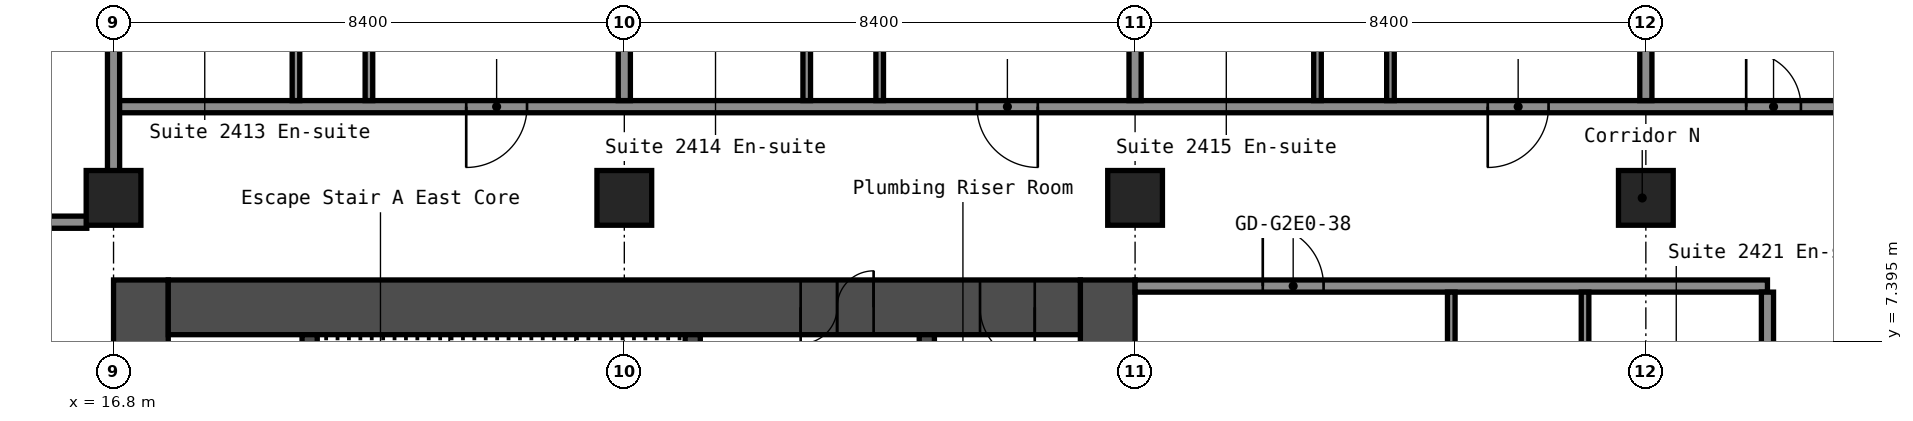
"""IFC4 building model, lengths in metres.
Left out: names, types, materials, properties, quantities, classifications, styles, units other than length and angle.
Written with IfcOpenShell. Run it as: python <this file> out.ifc"""

import sys

from ifc_helpers import new_model, si_unit, direction, frame, frame_2d, origin, origin_2d, place, context, subcontext, project, spatial, rectangle, hollow_rectangle, extrude, element, fill, save


model = new_model("IFC4")
c1 = context("Model", 3, precision=1e-05, world=origin(), true_north=direction((0.0, 1.0)))
c2 = subcontext(c1, "Body", "Model", "MODEL_VIEW")
j1 = project(units=[si_unit("LENGTHUNIT", "METRE"), si_unit("PLANEANGLEUNIT", "RADIAN")], contexts=[c1])
p1 = place(None, origin())
s1 = spatial("IfcSite", under=j1, at=p1, CompositionType="ELEMENT")
p2 = place(p1, origin())
s2 = spatial("IfcBuilding", under=s1, at=p2, CompositionType="ELEMENT")
p3 = place(p2, frame((0.0, 0.0, 88.2)))
s3 = spatial("IfcBuildingStorey", under=s2, at=p3, CompositionType="ELEMENT", Elevation=88.2)
for number, where, z_axis, x_axis in (
    (1, (16.8, 9.75, 0.0), (0.0, 0.0, 1.0), (1.0, 0.0, 0.0)),
    (2, (25.2, 9.75, 0.0), (0.0, 0.0, 1.0), (1.0, 0.0, 0.0)),
    (3, (33.6, 9.75, 0.0), (0.0, 0.0, 1.0), (1.0, 0.0, 0.0)),
    (4, (42.0, 9.75, 0.0), (0.0, 0.0, 1.0), (1.0, 0.0, 0.0)),
):
    element("IfcColumn", number, at=place(p3, frame(where, z_axis=z_axis, x_axis=x_axis)), inside=s3, PredefinedType="COLUMN", context=c2, shape_type="SweptSolid", body=[
        extrude(hollow_rectangle(XDim=0.9, YDim=0.9, WallThickness=0.036, at=origin_2d()), origin(), (0.0, 0.0, 1.0), 2.8),
    ])
p4 = place(p3, frame((17.25, -8.4, 0.0), z_axis=(0.0, 0.0, 1.0), x_axis=(0.0, 1.0, 0.0)))
e5 = element("IfcWall", 5, at=p4, inside=s3, PredefinedType="SHEAR", context=c2, shape_type="SweptSolid", body=[
    extrude(rectangle(XDim=16.8, YDim=0.9, at=frame_2d((8.4, 0.0))), origin(), (0.0, 0.0, 1.0), 2.8),
])
p5 = place(p4, frame((7.6, 0.0, 0.0)))
e6 = element("IfcOpeningElement", 6, at=p5, cuts=e5, PredefinedType="OPENING", context=c2, shape_type="SweptSolid", body=[
    extrude(rectangle(XDim=1.2, YDim=2.1, at=frame_2d((0.6, 1.05))), frame((0.0, 0.46, 0.0), z_axis=(0.0, -1.0, 0.0), x_axis=(1.0, 0.0, 0.0)), (0.0, 0.0, 1.0), 0.92),
])
p6 = place(p3, frame((33.15, -8.4, 0.0), z_axis=(0.0, 0.0, 1.0), x_axis=(0.0, 1.0, 0.0)))
e7 = element("IfcWall", 7, at=p6, inside=s3, PredefinedType="SHEAR", context=c2, shape_type="SweptSolid", body=[
    extrude(rectangle(XDim=16.8, YDim=0.9, at=frame_2d((8.4, 0.0))), origin(), (0.0, 0.0, 1.0), 2.8),
])
p7 = place(p3, frame((17.7, 7.95, 0.0), z_axis=(0.0, 0.0, 1.0), x_axis=(1.0, 0.0, 0.0)))
e8 = element("IfcWall", 8, at=p7, inside=s3, PredefinedType="SHEAR", context=c2, shape_type="SweptSolid", body=[
    extrude(rectangle(XDim=15.0, YDim=0.9, at=frame_2d((7.5, 0.0))), origin(), (0.0, 0.0, 1.0), 2.8),
])
p8 = place(p7, frame((10.4, 0.0, 0.0)))
e9 = element("IfcOpeningElement", 9, at=p8, cuts=e8, PredefinedType="OPENING", context=c2, shape_type="SweptSolid", body=[
    extrude(rectangle(XDim=1.2, YDim=2.1, at=frame_2d((0.6, 1.05))), frame((0.0, 0.46, 0.0), z_axis=(0.0, -1.0, 0.0), x_axis=(1.0, 0.0, 0.0)), (0.0, 0.0, 1.0), 0.92),
])
p9 = place(p7, frame((13.35, 0.0, 0.0)))
e10 = element("IfcOpeningElement", 10, at=p9, cuts=e8, PredefinedType="OPENING", context=c2, shape_type="SweptSolid", body=[
    extrude(rectangle(XDim=0.9, YDim=2.1, at=frame_2d((0.45, 1.05))), frame((0.0, 0.46, 0.0), z_axis=(0.0, -1.0, 0.0), x_axis=(1.0, 0.0, 0.0)), (0.0, 0.0, 1.0), 0.92),
])
p10 = place(p3, frame((20.025, 1.2, 0.0), z_axis=(0.0, 0.0, 1.0), x_axis=(0.0, 1.0, 0.0)))
e11 = element("IfcWall", 11, at=p10, inside=s3, PredefinedType="SHEAR", context=c2, shape_type="SweptSolid", body=[
    extrude(rectangle(XDim=6.3, YDim=0.25, at=frame_2d((3.15, 0.0))), origin(), (0.0, 0.0, 1.0), 2.8),
])
p11 = place(p3, frame((26.325, 3.75, 0.0), z_axis=(0.0, 0.0, 1.0), x_axis=(0.0, 1.0, 0.0)))
e12 = element("IfcWall", 12, at=p11, inside=s3, PredefinedType="SHEAR", context=c2, shape_type="SweptSolid", body=[
    extrude(rectangle(XDim=3.75, YDim=0.25, at=frame_2d((1.875, 0.0))), origin(), (0.0, 0.0, 1.0), 2.8),
])
p12 = place(p11, frame((1.25, 0.0, 0.0)))
e13 = element("IfcOpeningElement", 13, at=p12, cuts=e12, PredefinedType="OPENING", context=c2, shape_type="SweptSolid", body=[
    extrude(rectangle(XDim=1.2, YDim=2.1, at=frame_2d((0.6, 1.05))), frame((0.0, 0.135, 0.0), z_axis=(0.0, -1.0, 0.0), x_axis=(1.0, 0.0, 0.0)), (0.0, 0.0, 1.0), 0.27),
])
p13 = place(p3, frame((30.175, 1.45, 0.0), z_axis=(0.0, 0.0, 1.0), x_axis=(0.0, 1.0, 0.0)))
e14 = element("IfcWall", 14, at=p13, inside=s3, PredefinedType="SHEAR", context=c2, shape_type="SweptSolid", body=[
    extrude(rectangle(XDim=6.05, YDim=0.25, at=frame_2d((3.025, 0.0))), origin(), (0.0, 0.0, 1.0), 2.8),
])
p14 = place(p13, frame((2.625, 0.0, 0.0)))
e15 = element("IfcOpeningElement", 15, at=p14, cuts=e14, PredefinedType="OPENING", context=c2, shape_type="SweptSolid", body=[
    extrude(rectangle(XDim=1.1, YDim=2.1, at=frame_2d((0.55, 1.05))), frame((0.0, 0.135, 0.0), z_axis=(0.0, -1.0, 0.0), x_axis=(1.0, 0.0, 0.0)), (0.0, 0.0, 1.0), 0.27),
])
p15 = place(p3, frame((33.6, 8.3, 0.0), z_axis=(0.0, 0.0, 1.0), x_axis=(1.0, 0.0, 0.0)))
e16 = element("IfcWall", 16, at=p15, inside=s3, PredefinedType="PARTITIONING", context=c2, shape_type="SweptSolid", body=[
    extrude(rectangle(XDim=10.4, YDim=0.2, at=frame_2d((5.2, 0.0))), origin(), (0.0, 0.0, 1.0), 2.8),
])
p16 = place(p15, frame((2.1, 0.0, 0.0)))
e17 = element("IfcOpeningElement", 17, at=p16, cuts=e16, PredefinedType="OPENING", context=c2, shape_type="SweptSolid", body=[
    extrude(rectangle(XDim=1.0, YDim=2.1, at=frame_2d((0.5, 1.05))), frame((0.0, 0.11, 0.0), z_axis=(0.0, -1.0, 0.0), x_axis=(1.0, 0.0, 0.0)), (0.0, 0.0, 1.0), 0.22),
])
p17 = place(p3, frame((-16.36, 9.35, 0.0), z_axis=(0.0, 0.0, 1.0), x_axis=(1.0, 0.0, 0.0)))
e18 = element("IfcWall", 18, at=p17, inside=s3, PredefinedType="PARTITIONING", context=c2, shape_type="SweptSolid", body=[
    extrude(rectangle(XDim=32.72, YDim=0.2, at=frame_2d((16.36, 0.0))), origin(), (0.0, 0.0, 1.0), 2.8),
])
p18 = place(p17, frame((1.16, 0.0, 0.0)))
e19 = element("IfcOpeningElement", 19, at=p18, cuts=e18, PredefinedType="OPENING", context=c2, shape_type="SweptSolid", body=[
    extrude(rectangle(XDim=1.0, YDim=2.1, at=frame_2d((0.5, 1.05))), frame((0.0, 0.11, 0.0), z_axis=(0.0, -1.0, 0.0), x_axis=(1.0, 0.0, 0.0)), (0.0, 0.0, 1.0), 0.22),
])
p19 = place(p17, frame((9.56, 0.0, 0.0)))
e20 = element("IfcOpeningElement", 20, at=p19, cuts=e18, PredefinedType="OPENING", context=c2, shape_type="SweptSolid", body=[
    extrude(rectangle(XDim=1.0, YDim=2.1, at=frame_2d((0.5, 1.05))), frame((0.0, 0.11, 0.0), z_axis=(0.0, -1.0, 0.0), x_axis=(1.0, 0.0, 0.0)), (0.0, 0.0, 1.0), 0.22),
])
p20 = place(p17, frame((22.16, 0.0, 0.0)))
e21 = element("IfcOpeningElement", 21, at=p20, cuts=e18, PredefinedType="OPENING", context=c2, shape_type="SweptSolid", body=[
    extrude(rectangle(XDim=1.0, YDim=2.1, at=frame_2d((0.5, 1.05))), frame((0.0, 0.11, 0.0), z_axis=(0.0, -1.0, 0.0), x_axis=(1.0, 0.0, 0.0)), (0.0, 0.0, 1.0), 0.22),
])
p21 = place(p17, frame((30.56, 0.0, 0.0)))
e22 = element("IfcOpeningElement", 22, at=p21, cuts=e18, PredefinedType="OPENING", context=c2, shape_type="SweptSolid", body=[
    extrude(rectangle(XDim=1.0, YDim=2.1, at=frame_2d((0.5, 1.05))), frame((0.0, 0.11, 0.0), z_axis=(0.0, -1.0, 0.0), x_axis=(1.0, 0.0, 0.0)), (0.0, 0.0, 1.0), 0.22),
])
p22 = place(p3, frame((16.8, 11.25, 0.0), z_axis=(0.0, 0.0, 1.0), x_axis=(1.0, 0.0, 0.0)))
e23 = element("IfcWall", 23, at=p22, inside=s3, PredefinedType="PARTITIONING", context=c2, shape_type="SweptSolid", body=[
    extrude(rectangle(XDim=29.7, YDim=0.2, at=frame_2d((14.85, 0.0))), origin(), (0.0, 0.0, 1.0), 2.8),
])
p23 = place(p22, frame((5.8, 0.0, 0.0)))
e24 = element("IfcOpeningElement", 24, at=p23, cuts=e23, PredefinedType="OPENING", context=c2, shape_type="SweptSolid", body=[
    extrude(rectangle(XDim=1.0, YDim=2.1, at=frame_2d((0.5, 1.05))), frame((0.0, 0.11, 0.0), z_axis=(0.0, -1.0, 0.0), x_axis=(1.0, 0.0, 0.0)), (0.0, 0.0, 1.0), 0.22),
])
p24 = place(p22, frame((14.2, 0.0, 0.0)))
e25 = element("IfcOpeningElement", 25, at=p24, cuts=e23, PredefinedType="OPENING", context=c2, shape_type="SweptSolid", body=[
    extrude(rectangle(XDim=1.0, YDim=2.1, at=frame_2d((0.5, 1.05))), frame((0.0, 0.11, 0.0), z_axis=(0.0, -1.0, 0.0), x_axis=(1.0, 0.0, 0.0)), (0.0, 0.0, 1.0), 0.22),
])
p25 = place(p22, frame((22.6, 0.0, 0.0)))
e26 = element("IfcOpeningElement", 26, at=p25, cuts=e23, PredefinedType="OPENING", context=c2, shape_type="SweptSolid", body=[
    extrude(rectangle(XDim=1.0, YDim=2.1, at=frame_2d((0.5, 1.05))), frame((0.0, 0.11, 0.0), z_axis=(0.0, -1.0, 0.0), x_axis=(1.0, 0.0, 0.0)), (0.0, 0.0, 1.0), 0.22),
])
p26 = place(p22, frame((26.85, 0.0, 0.0)))
e27 = element("IfcOpeningElement", 27, at=p26, cuts=e23, PredefinedType="OPENING", context=c2, shape_type="SweptSolid", body=[
    extrude(rectangle(XDim=0.9, YDim=2.1, at=frame_2d((0.45, 1.05))), frame((0.0, 0.11, 0.0), z_axis=(0.0, -1.0, 0.0), x_axis=(1.0, 0.0, 0.0)), (0.0, 0.0, 1.0), 0.22),
])
p27 = place(p3, frame((16.8, 10.19, 0.0), z_axis=(0.0, 0.0, 1.0), x_axis=(0.0, 1.0, 0.0)))
e28 = element("IfcWall", 28, at=p27, inside=s3, PredefinedType="PARTITIONING", context=c2, shape_type="SweptSolid", body=[
    extrude(rectangle(XDim=13.36, YDim=0.2, at=frame_2d((6.68, 0.0))), origin(), (0.0, 0.0, 1.0), 2.8),
])
p28 = place(p3, frame((19.8, 11.35, 0.0), z_axis=(0.0, 0.0, 1.0), x_axis=(0.0, 1.0, 0.0)))
e29 = element("IfcWall", 29, at=p28, inside=s3, PredefinedType="PARTITIONING", context=c2, shape_type="SweptSolid", body=[
    extrude(rectangle(XDim=3.1, YDim=0.125, at=frame_2d((1.55, 0.0))), origin(), (0.0, 0.0, 1.0), 2.8),
])
p29 = place(p3, frame((21.0, 11.35, 0.0), z_axis=(0.0, 0.0, 1.0), x_axis=(0.0, 1.0, 0.0)))
e30 = element("IfcWall", 30, at=p29, inside=s3, PredefinedType="PARTITIONING", context=c2, shape_type="SweptSolid", body=[
    extrude(rectangle(XDim=12.2, YDim=0.125, at=frame_2d((6.1, 0.0))), origin(), (0.0, 0.0, 1.0), 2.8),
])
p30 = place(p29, frame((4.05, 0.0, 0.0)))
e31 = element("IfcOpeningElement", 31, at=p30, cuts=e30, PredefinedType="OPENING", context=c2, shape_type="SweptSolid", body=[
    extrude(rectangle(XDim=0.9, YDim=2.1, at=frame_2d((0.45, 1.05))), frame((0.0, 0.073, 0.0), z_axis=(0.0, -1.0, 0.0), x_axis=(1.0, 0.0, 0.0)), (0.0, 0.0, 1.0), 0.145),
])
p31 = place(p3, frame((25.2, 11.35, 0.0), z_axis=(0.0, 0.0, 1.0), x_axis=(0.0, 1.0, 0.0)))
e32 = element("IfcWall", 32, at=p31, inside=s3, PredefinedType="PARTITIONING", context=c2, shape_type="SweptSolid", body=[
    extrude(rectangle(XDim=12.2, YDim=0.2, at=frame_2d((6.1, 0.0))), origin(), (0.0, 0.0, 1.0), 2.8),
])
p32 = place(p3, frame((28.2, 11.35, 0.0), z_axis=(0.0, 0.0, 1.0), x_axis=(0.0, 1.0, 0.0)))
e33 = element("IfcWall", 33, at=p32, inside=s3, PredefinedType="PARTITIONING", context=c2, shape_type="SweptSolid", body=[
    extrude(rectangle(XDim=3.1, YDim=0.125, at=frame_2d((1.55, 0.0))), origin(), (0.0, 0.0, 1.0), 2.8),
])
p33 = place(p3, frame((29.4, 11.35, 0.0), z_axis=(0.0, 0.0, 1.0), x_axis=(0.0, 1.0, 0.0)))
e34 = element("IfcWall", 34, at=p33, inside=s3, PredefinedType="PARTITIONING", context=c2, shape_type="SweptSolid", body=[
    extrude(rectangle(XDim=12.2, YDim=0.125, at=frame_2d((6.1, 0.0))), origin(), (0.0, 0.0, 1.0), 2.8),
])
p34 = place(p33, frame((4.05, 0.0, 0.0)))
e35 = element("IfcOpeningElement", 35, at=p34, cuts=e34, PredefinedType="OPENING", context=c2, shape_type="SweptSolid", body=[
    extrude(rectangle(XDim=0.9, YDim=2.1, at=frame_2d((0.45, 1.05))), frame((0.0, 0.073, 0.0), z_axis=(0.0, -1.0, 0.0), x_axis=(1.0, 0.0, 0.0)), (0.0, 0.0, 1.0), 0.145),
])
p35 = place(p3, frame((33.6, 11.35, 0.0), z_axis=(0.0, 0.0, 1.0), x_axis=(0.0, 1.0, 0.0)))
e36 = element("IfcWall", 36, at=p35, inside=s3, PredefinedType="PARTITIONING", context=c2, shape_type="SweptSolid", body=[
    extrude(rectangle(XDim=12.2, YDim=0.2, at=frame_2d((6.1, 0.0))), origin(), (0.0, 0.0, 1.0), 2.8),
])
p36 = place(p3, frame((36.6, 11.35, 0.0), z_axis=(0.0, 0.0, 1.0), x_axis=(0.0, 1.0, 0.0)))
e37 = element("IfcWall", 37, at=p36, inside=s3, PredefinedType="PARTITIONING", context=c2, shape_type="SweptSolid", body=[
    extrude(rectangle(XDim=3.1, YDim=0.125, at=frame_2d((1.55, 0.0))), origin(), (0.0, 0.0, 1.0), 2.8),
])
p37 = place(p3, frame((37.8, 11.35, 0.0), z_axis=(0.0, 0.0, 1.0), x_axis=(0.0, 1.0, 0.0)))
e38 = element("IfcWall", 38, at=p37, inside=s3, PredefinedType="PARTITIONING", context=c2, shape_type="SweptSolid", body=[
    extrude(rectangle(XDim=12.2, YDim=0.125, at=frame_2d((6.1, 0.0))), origin(), (0.0, 0.0, 1.0), 2.8),
])
p38 = place(p37, frame((4.05, 0.0, 0.0)))
e39 = element("IfcOpeningElement", 39, at=p38, cuts=e38, PredefinedType="OPENING", context=c2, shape_type="SweptSolid", body=[
    extrude(rectangle(XDim=0.9, YDim=2.1, at=frame_2d((0.45, 1.05))), frame((0.0, 0.073, 0.0), z_axis=(0.0, -1.0, 0.0), x_axis=(1.0, 0.0, 0.0)), (0.0, 0.0, 1.0), 0.145),
])
p39 = place(p3, frame((38.8, -8.2, 0.0), z_axis=(0.0, 0.0, 1.0), x_axis=(0.0, 1.0, 0.0)))
e40 = element("IfcWall", 40, at=p39, inside=s3, PredefinedType="PARTITIONING", context=c2, shape_type="SweptSolid", body=[
    extrude(rectangle(XDim=16.4, YDim=0.125, at=frame_2d((8.2, 0.0))), origin(), (0.0, 0.0, 1.0), 2.8),
])
p40 = place(p39, frame((4.05, 0.0, 0.0)))
e41 = element("IfcOpeningElement", 41, at=p40, cuts=e40, PredefinedType="OPENING", context=c2, shape_type="SweptSolid", body=[
    extrude(rectangle(XDim=0.9, YDim=2.1, at=frame_2d((0.45, 1.05))), frame((0.0, 0.073, 0.0), z_axis=(0.0, -1.0, 0.0), x_axis=(1.0, 0.0, 0.0)), (0.0, 0.0, 1.0), 0.145),
])
p41 = place(p39, frame((11.45, 0.0, 0.0)))
e42 = element("IfcOpeningElement", 42, at=p41, cuts=e40, PredefinedType="OPENING", context=c2, shape_type="SweptSolid", body=[
    extrude(rectangle(XDim=0.9, YDim=2.1, at=frame_2d((0.45, 1.05))), frame((0.0, 0.073, 0.0), z_axis=(0.0, -1.0, 0.0), x_axis=(1.0, 0.0, 0.0)), (0.0, 0.0, 1.0), 0.145),
])
p42 = place(p3, frame((41.0, 5.1, 0.0), z_axis=(0.0, 0.0, 1.0), x_axis=(0.0, 1.0, 0.0)))
e43 = element("IfcWall", 43, at=p42, inside=s3, PredefinedType="PARTITIONING", context=c2, shape_type="SweptSolid", body=[
    extrude(rectangle(XDim=3.1, YDim=0.125, at=frame_2d((1.55, 0.0))), origin(), (0.0, 0.0, 1.0), 2.8),
])
p43 = place(p3, frame((42.0, 11.35, 0.0), z_axis=(0.0, 0.0, 1.0), x_axis=(0.0, 1.0, 0.0)))
e44 = element("IfcWall", 44, at=p43, inside=s3, PredefinedType="PARTITIONING", context=c2, shape_type="SweptSolid", body=[
    extrude(rectangle(XDim=12.2, YDim=0.2, at=frame_2d((6.1, 0.0))), origin(), (0.0, 0.0, 1.0), 2.8),
])
p44 = place(p3, frame((44.0, -8.2, 0.0), z_axis=(0.0, 0.0, 1.0), x_axis=(0.0, 1.0, 0.0)))
e45 = element("IfcWall", 45, at=p44, inside=s3, PredefinedType="PARTITIONING", context=c2, shape_type="SweptSolid", body=[
    extrude(rectangle(XDim=16.4, YDim=0.2, at=frame_2d((8.2, 0.0))), origin(), (0.0, 0.0, 1.0), 2.8),
])
p45 = place(p8, origin())
e46 = element("IfcDoor", 46, at=p45, inside=s3, OperationType="DOUBLE_DOOR_SINGLE_SWING", PredefinedType="DOOR", context=c2, shape_type="SweptSolid", body=[
    extrude(rectangle(XDim=1.2, YDim=2.1, at=frame_2d((0.6, 1.05))), frame((0.0, 0.025, 0.0), z_axis=(0.0, -1.0, 0.0), x_axis=(1.0, 0.0, 0.0)), (0.0, 0.0, 1.0), 0.05),
])
fill(e9, e46)
p46 = place(p9, origin())
e47 = element("IfcDoor", 47, at=p46, inside=s3, OperationType="SINGLE_SWING_RIGHT", PredefinedType="DOOR", context=c2, shape_type="SweptSolid", body=[
    extrude(rectangle(XDim=0.9, YDim=2.1, at=frame_2d((0.45, 1.05))), frame((0.0, 0.025, 0.0), z_axis=(0.0, -1.0, 0.0), x_axis=(1.0, 0.0, 0.0)), (0.0, 0.0, 1.0), 0.05),
])
fill(e10, e47)
p47 = place(p16, origin())
e48 = element("IfcDoor", 48, at=p47, inside=s3, OperationType="SINGLE_SWING_RIGHT", PredefinedType="DOOR", context=c2, shape_type="SweptSolid", body=[
    extrude(rectangle(XDim=1.0, YDim=2.1, at=frame_2d((0.5, 1.05))), frame((0.0, 0.025, 0.0), z_axis=(0.0, -1.0, 0.0), x_axis=(1.0, 0.0, 0.0)), (0.0, 0.0, 1.0), 0.05),
])
fill(e17, e48)
p48 = place(p23, origin())
e49 = element("IfcDoor", 49, at=p48, inside=s3, OperationType="SINGLE_SWING_LEFT", PredefinedType="DOOR", context=c2, shape_type="SweptSolid", body=[
    extrude(rectangle(XDim=1.0, YDim=2.1, at=frame_2d((0.5, 1.05))), frame((0.0, 0.025, 0.0), z_axis=(0.0, -1.0, 0.0), x_axis=(1.0, 0.0, 0.0)), (0.0, 0.0, 1.0), 0.05),
])
fill(e24, e49)
p49 = place(p24, origin())
e50 = element("IfcDoor", 50, at=p49, inside=s3, OperationType="SINGLE_SWING_RIGHT", PredefinedType="DOOR", context=c2, shape_type="SweptSolid", body=[
    extrude(rectangle(XDim=1.0, YDim=2.1, at=frame_2d((0.5, 1.05))), frame((0.0, 0.025, 0.0), z_axis=(0.0, -1.0, 0.0), x_axis=(1.0, 0.0, 0.0)), (0.0, 0.0, 1.0), 0.05),
])
fill(e25, e50)
p50 = place(p25, origin())
e51 = element("IfcDoor", 51, at=p50, inside=s3, OperationType="SINGLE_SWING_LEFT", PredefinedType="DOOR", context=c2, shape_type="SweptSolid", body=[
    extrude(rectangle(XDim=1.0, YDim=2.1, at=frame_2d((0.5, 1.05))), frame((0.0, 0.025, 0.0), z_axis=(0.0, -1.0, 0.0), x_axis=(1.0, 0.0, 0.0)), (0.0, 0.0, 1.0), 0.05),
])
fill(e26, e51)
p51 = place(p26, origin())
e52 = element("IfcDoor", 52, at=p51, inside=s3, OperationType="SINGLE_SWING_RIGHT", PredefinedType="DOOR", context=c2, shape_type="SweptSolid", body=[
    extrude(rectangle(XDim=0.9, YDim=2.1, at=frame_2d((0.45, 1.05))), frame((0.0, 0.025, 0.0), z_axis=(0.0, -1.0, 0.0), x_axis=(1.0, 0.0, 0.0)), (0.0, 0.0, 1.0), 0.05),
])
fill(e27, e52)
save(model, sys.argv[1])
